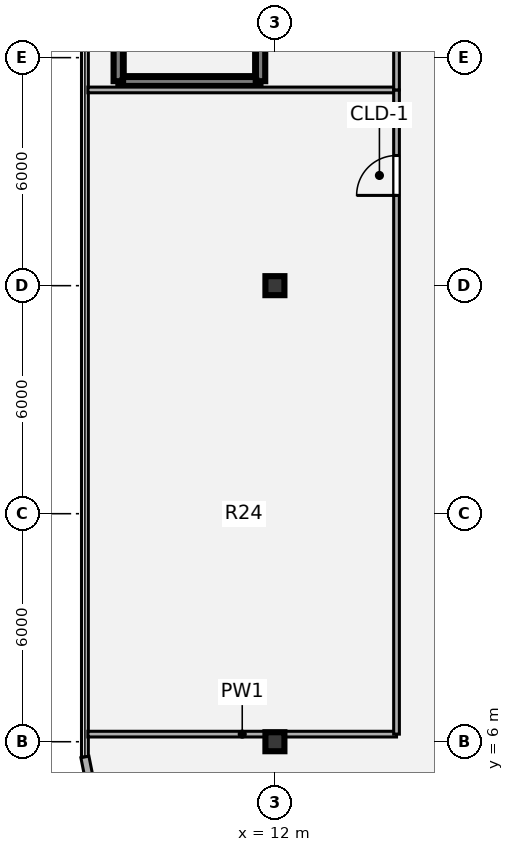
"""IFC4 building model, lengths in metres.
Left out: names, types, materials, properties, quantities, classifications, styles, units other than length and angle.
Written with IfcOpenShell. Run it as: python <this file> out.ifc"""

import sys

from ifc_helpers import new_model, si_unit, direction, frame, frame_2d, origin, origin_2d, place, context, subcontext, project, spatial, rectangle, i_section, extrude, source, transform, mapped, element, fill, save


model = new_model("IFC4")
c1 = context("Model", 3, precision=1e-05, world=origin(), true_north=direction((0.0, 1.0)))
c2 = subcontext(c1, "Body", "Model", "MODEL_VIEW")
j1 = project(units=[si_unit("LENGTHUNIT", "METRE"), si_unit("PLANEANGLEUNIT", "RADIAN")], contexts=[c1])
p1 = place(None, origin())
s1 = spatial("IfcSite", under=j1, at=p1, CompositionType="ELEMENT")
p2 = place(p1, origin())
s2 = spatial("IfcBuilding", under=s1, at=p2, CompositionType="ELEMENT")
p3 = place(p2, frame((0.0, 0.0, 9.72)))
s3 = spatial("IfcBuildingStorey", under=s2, at=p3, CompositionType="ELEMENT", Elevation=9.72)
m1 = source(origin(), c2, "Body", "SweptSolid", [
    extrude(i_section(OverallWidth=0.5, OverallDepth=0.5, WebThickness=0.022, FlangeThickness=0.035, at=origin_2d()), origin(), (0.0, 0.0, 1.0), 4.32),
])
for number, where, z_axis, x_axis in (
    (1, (12.0, 6.0, 0.0), (0.0, 0.0, 1.0), (1.0, 0.0, 0.0)),
    (2, (12.0, 18.0, 0.0), (0.0, 0.0, 1.0), (1.0, 0.0, 0.0)),
):
    element("IfcColumn", number, at=place(p3, frame(where, z_axis=z_axis, x_axis=x_axis)), inside=s3, PredefinedType="COLUMN", context=c2, shape_type="MappedRepresentation", body=[
        mapped(m1, transform((0.0, 0.0, 0.0), x_axis=(1.0, 0.0, 0.0), y_axis=(0.0, 1.0, 0.0), z_axis=(0.0, 0.0, 1.0), scale=1.0)),
    ])
p4 = place(p3, frame((7.244, 4.375, 0.0), z_axis=(0.0, 0.0, 1.0), x_axis=(-0.195138390419, 0.980775717779, 0.0)))
e3 = element("IfcWall", 3, at=p4, inside=s3, PredefinedType="SOLIDWALL", context=c2, shape_type="SweptSolid", body=[
    extrude(rectangle(XDim=1.249, YDim=0.215, at=frame_2d((0.624, 0.0))), origin(), (0.0, 0.0, 1.0), 4.04),
])
p5 = place(p3, frame((7.88, 23.38, 0.0), z_axis=(0.0, 0.0, 1.0), x_axis=(1.0, 0.0, 0.0)))
e4 = element("IfcWall", 4, at=p5, inside=s3, PredefinedType="SHEAR", context=c2, shape_type="SweptSolid", body=[
    extrude(rectangle(XDim=3.74, YDim=0.25, at=frame_2d((1.87, 0.0))), origin(), (0.0, 0.0, 1.0), 4.32),
])
for number, where, z_axis, x_axis in (
    (5, (7.88, 23.38, 0.0), (0.0, 0.0, 1.0), (0.0, 1.0, 0.0)),
    (6, (11.62, 23.38, 0.0), (0.0, 0.0, 1.0), (0.0, 1.0, 0.0)),
):
    element("IfcWall", number, at=place(p3, frame(where, z_axis=z_axis, x_axis=x_axis)), inside=s3, PredefinedType="SHEAR", context=c2, shape_type="SweptSolid", body=[
        extrude(rectangle(XDim=7.47, YDim=0.25, at=frame_2d((3.735, 0.0))), origin(), (0.0, 0.0, 1.0), 4.32),
    ])
p6 = place(p3, frame((7.08, 6.2, 0.0), z_axis=(0.0, 0.0, 1.0), x_axis=(1.0, 0.0, 0.0)))
e7 = element("IfcWall", 7, at=p6, inside=s3, PredefinedType="PARTITIONING", context=c2, shape_type="SweptSolid", body=[
    extrude(rectangle(XDim=8.12, YDim=0.15, at=frame_2d((4.06, 0.0))), origin(), (0.0, 0.0, 1.0), 3.325),
])
p7 = place(p3, frame((7.08, 23.15, 0.0), z_axis=(0.0, 0.0, 1.0), x_axis=(1.0, 0.0, 0.0)))
e8 = element("IfcWall", 8, at=p7, inside=s3, PredefinedType="PARTITIONING", context=c2, shape_type="SweptSolid", body=[
    extrude(rectangle(XDim=8.12, YDim=0.15, at=frame_2d((4.06, 0.0))), origin(), (0.0, 0.0, 1.0), 4.01),
])
p8 = place(p3, frame((15.2, 6.2, 0.0), z_axis=(0.0, 0.0, 1.0), x_axis=(0.0, 1.0, 0.0)))
e9 = element("IfcWall", 9, at=p8, inside=s3, PredefinedType="PARTITIONING", context=c2, shape_type="SweptSolid", body=[
    extrude(rectangle(XDim=16.95, YDim=0.15, at=frame_2d((8.475, 0.0))), origin(), (0.0, 0.0, 1.0), 4.01),
])
p9 = place(p8, frame((14.175, 0.0, 0.0)))
e10 = element("IfcOpeningElement", 10, at=p9, cuts=e9, PredefinedType="OPENING", context=c2, shape_type="SweptSolid", body=[
    extrude(rectangle(XDim=1.05, YDim=2.1, at=origin_2d()), frame((0.525, 0.085, 1.05), z_axis=(0.0, -1.0, 0.0), x_axis=(1.0, 0.0, 0.0)), (0.0, 0.0, 1.0), 0.17),
])
p10 = place(p3, frame((15.2, 23.15, 0.0), z_axis=(0.0, 0.0, 1.0), x_axis=(0.0, 1.0, 0.0)))
e11 = element("IfcWall", 11, at=p10, inside=s3, PredefinedType="PARTITIONING", context=c2, shape_type="SweptSolid", body=[
    extrude(rectangle(XDim=3.65, YDim=0.15, at=frame_2d((1.825, 0.0))), origin(), (0.0, 0.0, 1.0), 4.01),
])
p11 = place(p10, frame((1.425, 0.0, 0.0)))
e12 = element("IfcOpeningElement", 12, at=p11, cuts=e11, PredefinedType="OPENING", context=c2, shape_type="SweptSolid", body=[
    extrude(rectangle(XDim=1.05, YDim=2.1, at=origin_2d()), frame((0.525, 0.085, 1.05), z_axis=(0.0, -1.0, 0.0), x_axis=(1.0, 0.0, 0.0)), (0.0, 0.0, 1.0), 0.17),
])
m2 = source(origin(), c2, "Body", "SweptSolid", [
    extrude(rectangle(XDim=1.05, YDim=2.1, at=origin_2d()), frame((0.525, 0.025, 1.05), z_axis=(0.0, -1.0, 0.0), x_axis=(1.0, 0.0, 0.0)), (0.0, 0.0, 1.0), 0.05),
])
p12 = place(p9, origin())
e13 = element("IfcDoor", 13, at=p12, inside=s3, OperationType="SINGLE_SWING_LEFT", PredefinedType="DOOR", context=c2, shape_type="MappedRepresentation", body=[
    mapped(m2, transform((0.0, 0.0, 0.0), x_axis=(1.0, 0.0, 0.0), y_axis=(0.0, 1.0, 0.0), z_axis=(0.0, 0.0, 1.0), scale=1.0)),
])
fill(e10, e13)
save(model, sys.argv[1])
